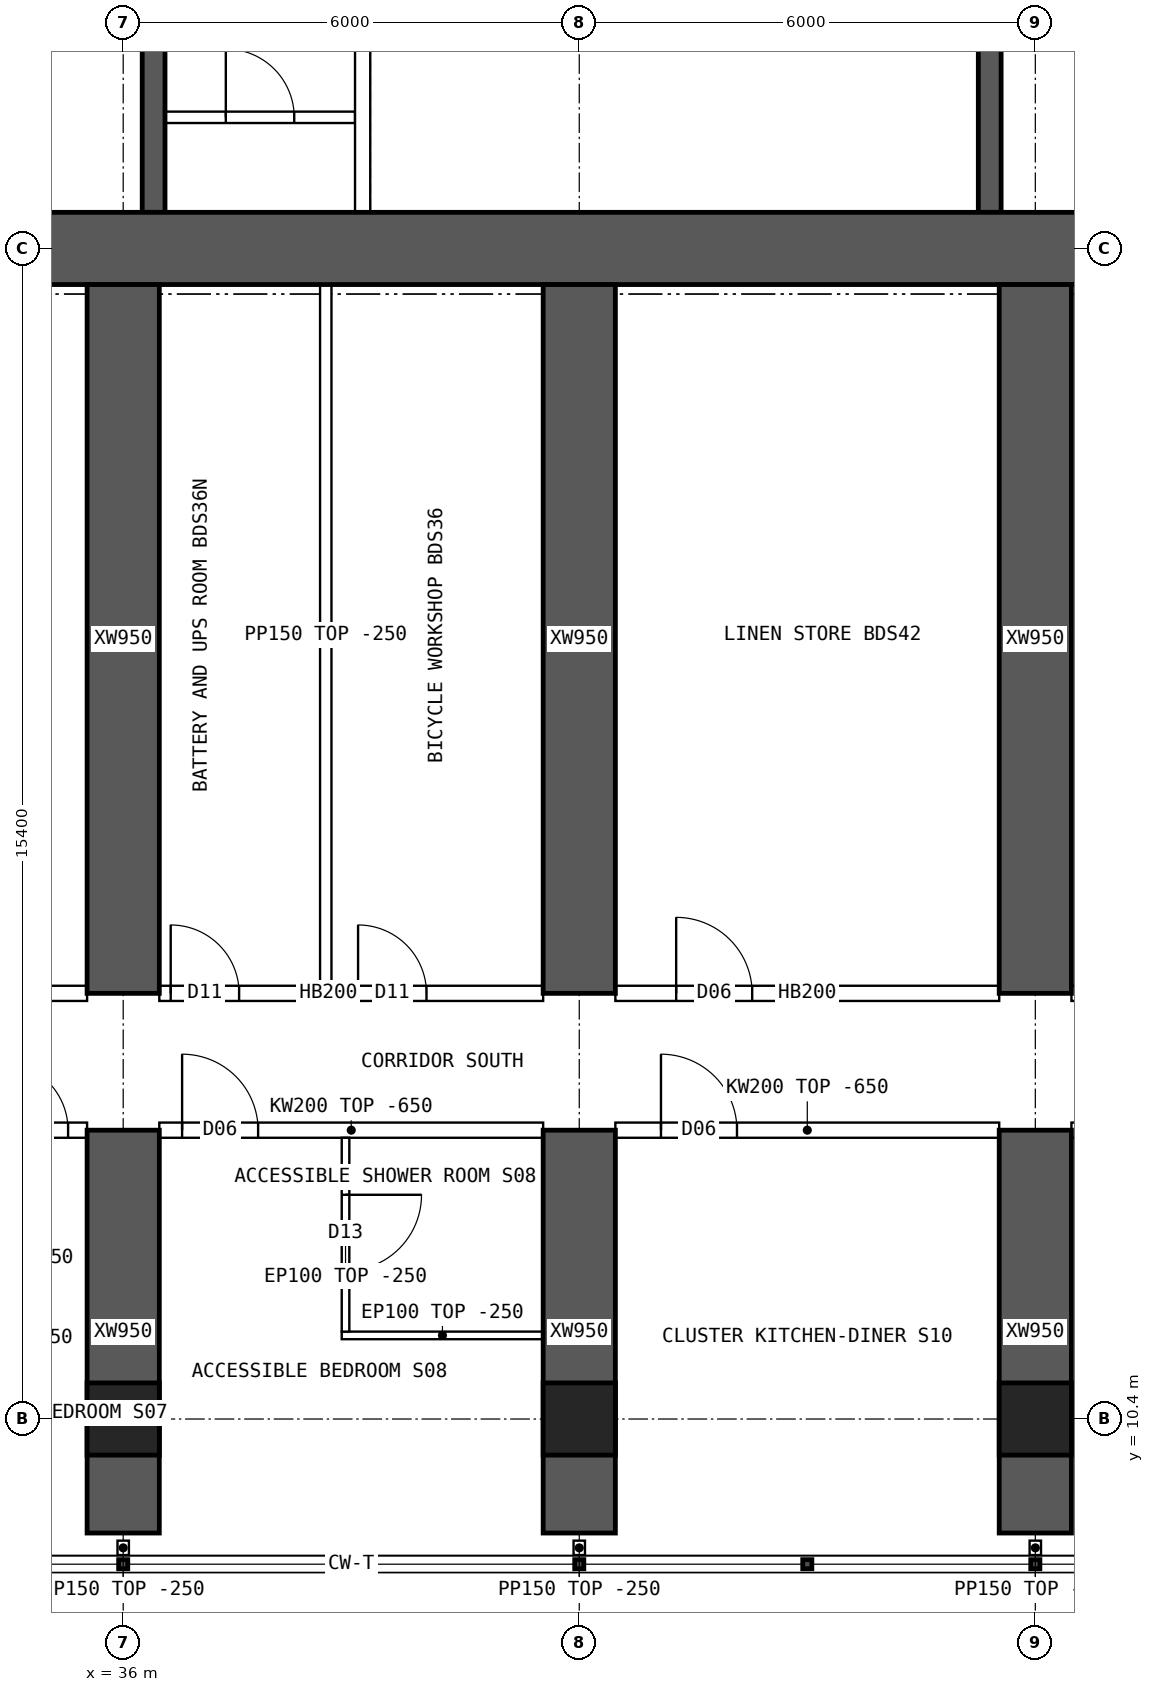
"""IFC4 building model, lengths in metres.
Left out: names, types, materials, properties, quantities, classifications, styles, units other than length and angle.
Written with IfcOpenShell. Run it as: python <this file> out.ifc"""

import sys

from ifc_helpers import new_model, si_unit, direction, frame, frame_2d, origin, origin_2d, place, context, subcontext, project, spatial, polyline, rectangle, hollow_rectangle, outline, extrude, element, fill, save


model = new_model("IFC4")
c1 = context("Model", 3, precision=1e-05, world=origin(), true_north=direction((0.0, 1.0)))
c2 = subcontext(c1, "Body", "Model", "MODEL_VIEW")
j1 = project(units=[si_unit("LENGTHUNIT", "METRE"), si_unit("PLANEANGLEUNIT", "RADIAN")], contexts=[c1])
p1 = place(None, origin())
s1 = spatial("IfcSite", under=j1, at=p1, CompositionType="ELEMENT")
p2 = place(p1, origin())
s2 = spatial("IfcBuilding", under=s1, at=p2, CompositionType="ELEMENT")
p3 = place(p2, frame((0.0, 0.0, 114.4)))
s3 = spatial("IfcBuildingStorey", under=s2, at=p3, CompositionType="ELEMENT", Elevation=114.4)
for number, where, z_axis, x_axis in (
    (1, (36.0, 10.4, 0.0), (0.0, 0.0, 1.0), (1.0, 0.0, 0.0)),
    (2, (42.0, 10.4, 0.0), (0.0, 0.0, 1.0), (1.0, 0.0, 0.0)),
    (3, (48.0, 10.4, 0.0), (0.0, 0.0, 1.0), (1.0, 0.0, 0.0)),
):
    element("IfcColumn", number, at=place(p3, frame(where, z_axis=z_axis, x_axis=x_axis)), inside=s3, PredefinedType="COLUMN", context=c2, shape_type="SweptSolid", body=[
        extrude(hollow_rectangle(XDim=0.95, YDim=0.95, WallThickness=0.095, at=origin_2d()), origin(), (0.0, 0.0, 1.0), 3.75),
    ])
p4 = place(p3, frame((18.0, 25.8, 0.0), z_axis=(0.0, 0.0, 1.0), x_axis=(1.0, 0.0, 0.0)))
e4 = element("IfcWall", 4, at=p4, inside=s3, PredefinedType="SHEAR", context=c2, shape_type="SweptSolid", body=[
    extrude(rectangle(XDim=48.0, YDim=0.95, at=frame_2d((24.0, 0.0))), origin(), (0.0, 0.0, 1.0), 3.75),
])
for number, where, z_axis, x_axis in (
    (5, (36.4, 26.275, 0.0), (0.0, 0.0, 1.0), (0.0, 1.0, 0.0)),
    (6, (47.4, 26.275, 0.0), (0.0, 0.0, 1.0), (0.0, 1.0, 0.0)),
):
    element("IfcWall", number, at=place(p3, frame(where, z_axis=z_axis, x_axis=x_axis)), inside=s3, PredefinedType="SHEAR", context=c2, shape_type="SweptSolid", body=[
        extrude(rectangle(XDim=3.975, YDim=0.3, at=frame_2d((1.988, 0.0))), origin(), (0.0, 0.0, 1.0), 3.75),
    ])
p5 = place(p3, frame((36.0, 8.9, 0.0), z_axis=(0.0, 0.0, 1.0), x_axis=(0.0, 1.0, 0.0)))
e7 = element("IfcWall", 7, at=p5, inside=s3, PredefinedType="SHEAR", context=c2, shape_type="SweptSolid", body=[
    extrude(rectangle(XDim=5.3, YDim=0.95, at=frame_2d((2.65, 0.0))), origin(), (0.0, 0.0, 1.0), 3.75),
])
p6 = place(p3, frame((36.0, 16.0, 0.0), z_axis=(0.0, 0.0, 1.0), x_axis=(0.0, 1.0, 0.0)))
e8 = element("IfcWall", 8, at=p6, inside=s3, PredefinedType="SHEAR", context=c2, shape_type="SweptSolid", body=[
    extrude(rectangle(XDim=9.325, YDim=0.95, at=frame_2d((4.663, 0.0))), origin(), (0.0, 0.0, 1.0), 3.75),
])
p7 = place(p3, frame((42.0, 8.9, 0.0), z_axis=(0.0, 0.0, 1.0), x_axis=(0.0, 1.0, 0.0)))
e9 = element("IfcWall", 9, at=p7, inside=s3, PredefinedType="SHEAR", context=c2, shape_type="SweptSolid", body=[
    extrude(rectangle(XDim=5.3, YDim=0.95, at=frame_2d((2.65, 0.0))), origin(), (0.0, 0.0, 1.0), 3.75),
])
p8 = place(p3, frame((42.0, 16.0, 0.0), z_axis=(0.0, 0.0, 1.0), x_axis=(0.0, 1.0, 0.0)))
e10 = element("IfcWall", 10, at=p8, inside=s3, PredefinedType="SHEAR", context=c2, shape_type="SweptSolid", body=[
    extrude(rectangle(XDim=9.325, YDim=0.95, at=frame_2d((4.663, 0.0))), origin(), (0.0, 0.0, 1.0), 3.75),
])
p9 = place(p3, frame((48.0, 8.9, 0.0), z_axis=(0.0, 0.0, 1.0), x_axis=(0.0, 1.0, 0.0)))
e11 = element("IfcWall", 11, at=p9, inside=s3, PredefinedType="SHEAR", context=c2, shape_type="SweptSolid", body=[
    extrude(rectangle(XDim=5.3, YDim=0.95, at=frame_2d((2.65, 0.0))), origin(), (0.0, 0.0, 1.0), 3.75),
])
p10 = place(p3, frame((48.0, 16.0, 0.0), z_axis=(0.0, 0.0, 1.0), x_axis=(0.0, 1.0, 0.0)))
e12 = element("IfcWall", 12, at=p10, inside=s3, PredefinedType="SHEAR", context=c2, shape_type="SweptSolid", body=[
    extrude(rectangle(XDim=9.325, YDim=0.95, at=frame_2d((4.663, 0.0))), origin(), (0.0, 0.0, 1.0), 3.75),
])
p11 = place(p3, frame((36.55, 27.525, 0.0), z_axis=(0.0, 0.0, 1.0), x_axis=(1.0, 0.0, 0.0)))
e13 = element("IfcWall", 13, at=p11, inside=s3, PredefinedType="SOLIDWALL", context=c2, shape_type="SweptSolid", body=[
    extrude(rectangle(XDim=2.5, YDim=0.15, at=frame_2d((1.25, 0.0))), origin(), (0.0, 0.0, 1.0), 3.5),
])
p12 = place(p11, frame((0.8, 0.0, 0.0)))
e14 = element("IfcOpeningElement", 14, at=p12, cuts=e13, PredefinedType="OPENING", context=c2, shape_type="SweptSolid", body=[
    extrude(rectangle(XDim=0.9, YDim=2.1, at=frame_2d((0.45, 1.05))), frame((0.0, 0.085, 0.0), z_axis=(0.0, -1.0, 0.0), x_axis=(1.0, 0.0, 0.0)), (0.0, 0.0, 1.0), 0.17),
])
p13 = place(p3, frame((39.15, 26.275, 0.0), z_axis=(0.0, 0.0, 1.0), x_axis=(0.0, 1.0, 0.0)))
e15 = element("IfcWall", 15, at=p13, inside=s3, PredefinedType="SOLIDWALL", context=c2, shape_type="SweptSolid", body=[
    extrude(rectangle(XDim=3.975, YDim=0.2, at=frame_2d((1.988, 0.0))), origin(), (0.0, 0.0, 1.0), 3.5),
])
p14 = place(p3, frame((30.475, 14.2, 0.0), z_axis=(0.0, 0.0, 1.0), x_axis=(1.0, 0.0, 0.0)))
e16 = element("IfcWall", 16, at=p14, inside=s3, PredefinedType="SOLIDWALL", context=c2, shape_type="SweptSolid", body=[
    extrude(outline(polyline([(0.0, 0.0), (5.05, 0.0), (5.05, 3.1), (0.0, 3.1), (0.0, 0.0)])), frame((0.0, 0.1, 0.0), z_axis=(0.0, -1.0, 0.0), x_axis=(1.0, 0.0, 0.0)), (0.0, 0.0, 1.0), 0.2),
])
p15 = place(p14, frame((0.1, 0.0, 0.0)))
e17 = element("IfcOpeningElement", 17, at=p15, cuts=e16, PredefinedType="OPENING", context=c2, shape_type="SweptSolid", body=[
    extrude(rectangle(XDim=0.9, YDim=2.1, at=frame_2d((0.45, 1.05))), frame((0.0, 0.11, 0.0), z_axis=(0.0, -1.0, 0.0), x_axis=(1.0, 0.0, 0.0)), (0.0, 0.0, 1.0), 0.22),
])
p16 = place(p14, frame((3.9, 0.0, 0.0)))
e18 = element("IfcOpeningElement", 18, at=p16, cuts=e16, PredefinedType="OPENING", context=c2, shape_type="SweptSolid", body=[
    extrude(rectangle(XDim=0.9, YDim=2.1, at=frame_2d((0.45, 1.05))), frame((0.0, 0.11, 0.0), z_axis=(0.0, -1.0, 0.0), x_axis=(1.0, 0.0, 0.0)), (0.0, 0.0, 1.0), 0.22),
])
p17 = place(p3, frame((30.475, 16.0, 0.0), z_axis=(0.0, 0.0, 1.0), x_axis=(1.0, 0.0, 0.0)))
e19 = element("IfcWall", 19, at=p17, inside=s3, PredefinedType="SOLIDWALL", context=c2, shape_type="SweptSolid", body=[
    extrude(rectangle(XDim=5.05, YDim=0.2, at=frame_2d((2.525, 0.0))), origin(), (0.0, 0.0, 1.0), 3.5),
])
p18 = place(p17, frame((0.8, 0.0, 0.0)))
e20 = element("IfcOpeningElement", 20, at=p18, cuts=e19, PredefinedType="OPENING", context=c2, shape_type="SweptSolid", body=[
    extrude(rectangle(XDim=1.0, YDim=2.1, at=frame_2d((0.5, 1.05))), frame((0.0, 0.11, 0.0), z_axis=(0.0, -1.0, 0.0), x_axis=(1.0, 0.0, 0.0)), (0.0, 0.0, 1.0), 0.22),
])
p19 = place(p3, frame((36.475, 14.2, 0.0), z_axis=(0.0, 0.0, 1.0), x_axis=(1.0, 0.0, 0.0)))
e21 = element("IfcWall", 21, at=p19, inside=s3, PredefinedType="SOLIDWALL", context=c2, shape_type="SweptSolid", body=[
    extrude(outline(polyline([(0.0, 0.0), (5.05, 0.0), (5.05, 3.1), (0.0, 3.1), (0.0, 0.0)])), frame((0.0, 0.1, 0.0), z_axis=(0.0, -1.0, 0.0), x_axis=(1.0, 0.0, 0.0)), (0.0, 0.0, 1.0), 0.2),
])
p20 = place(p19, frame((0.3, 0.0, 0.0)))
e22 = element("IfcOpeningElement", 22, at=p20, cuts=e21, PredefinedType="OPENING", context=c2, shape_type="SweptSolid", body=[
    extrude(rectangle(XDim=1.0, YDim=2.1, at=frame_2d((0.5, 1.05))), frame((0.0, 0.11, 0.0), z_axis=(0.0, -1.0, 0.0), x_axis=(1.0, 0.0, 0.0)), (0.0, 0.0, 1.0), 0.22),
])
p21 = place(p3, frame((36.475, 16.0, 0.0), z_axis=(0.0, 0.0, 1.0), x_axis=(1.0, 0.0, 0.0)))
e23 = element("IfcWall", 23, at=p21, inside=s3, PredefinedType="SOLIDWALL", context=c2, shape_type="SweptSolid", body=[
    extrude(rectangle(XDim=5.05, YDim=0.2, at=frame_2d((2.525, 0.0))), origin(), (0.0, 0.0, 1.0), 3.5),
])
p22 = place(p21, frame((0.15, 0.0, 0.0)))
e24 = element("IfcOpeningElement", 24, at=p22, cuts=e23, PredefinedType="OPENING", context=c2, shape_type="SweptSolid", body=[
    extrude(rectangle(XDim=0.9, YDim=2.1, at=frame_2d((0.45, 1.05))), frame((0.0, 0.11, 0.0), z_axis=(0.0, -1.0, 0.0), x_axis=(1.0, 0.0, 0.0)), (0.0, 0.0, 1.0), 0.22),
])
p23 = place(p21, frame((2.615, 0.0, 0.0)))
e25 = element("IfcOpeningElement", 25, at=p23, cuts=e23, PredefinedType="OPENING", context=c2, shape_type="SweptSolid", body=[
    extrude(rectangle(XDim=0.9, YDim=2.1, at=frame_2d((0.45, 1.05))), frame((0.0, 0.11, 0.0), z_axis=(0.0, -1.0, 0.0), x_axis=(1.0, 0.0, 0.0)), (0.0, 0.0, 1.0), 0.22),
])
p24 = place(p3, frame((42.475, 14.2, 0.0), z_axis=(0.0, 0.0, 1.0), x_axis=(1.0, 0.0, 0.0)))
e26 = element("IfcWall", 26, at=p24, inside=s3, PredefinedType="SOLIDWALL", context=c2, shape_type="SweptSolid", body=[
    extrude(outline(polyline([(0.0, 0.0), (5.05, 0.0), (5.05, 3.1), (0.0, 3.1), (0.0, 0.0)])), frame((0.0, 0.1, 0.0), z_axis=(0.0, -1.0, 0.0), x_axis=(1.0, 0.0, 0.0)), (0.0, 0.0, 1.0), 0.2),
])
p25 = place(p24, frame((0.6, 0.0, 0.0)))
e27 = element("IfcOpeningElement", 27, at=p25, cuts=e26, PredefinedType="OPENING", context=c2, shape_type="SweptSolid", body=[
    extrude(rectangle(XDim=1.0, YDim=2.1, at=frame_2d((0.5, 1.05))), frame((0.0, 0.11, 0.0), z_axis=(0.0, -1.0, 0.0), x_axis=(1.0, 0.0, 0.0)), (0.0, 0.0, 1.0), 0.22),
])
p26 = place(p3, frame((42.475, 16.0, 0.0), z_axis=(0.0, 0.0, 1.0), x_axis=(1.0, 0.0, 0.0)))
e28 = element("IfcWall", 28, at=p26, inside=s3, PredefinedType="SOLIDWALL", context=c2, shape_type="SweptSolid", body=[
    extrude(rectangle(XDim=5.05, YDim=0.2, at=frame_2d((2.525, 0.0))), origin(), (0.0, 0.0, 1.0), 3.5),
])
p27 = place(p26, frame((0.8, 0.0, 0.0)))
e29 = element("IfcOpeningElement", 29, at=p27, cuts=e28, PredefinedType="OPENING", context=c2, shape_type="SweptSolid", body=[
    extrude(rectangle(XDim=1.0, YDim=2.1, at=frame_2d((0.5, 1.05))), frame((0.0, 0.11, 0.0), z_axis=(0.0, -1.0, 0.0), x_axis=(1.0, 0.0, 0.0)), (0.0, 0.0, 1.0), 0.22),
])
p28 = place(p3, frame((48.475, 14.2, 0.0), z_axis=(0.0, 0.0, 1.0), x_axis=(1.0, 0.0, 0.0)))
e30 = element("IfcWall", 30, at=p28, inside=s3, PredefinedType="SOLIDWALL", context=c2, shape_type="SweptSolid", body=[
    extrude(outline(polyline([(0.0, 0.0), (5.05, 0.0), (5.05, 3.1), (0.0, 3.1), (0.0, 0.0)])), frame((0.0, 0.1, 0.0), z_axis=(0.0, -1.0, 0.0), x_axis=(1.0, 0.0, 0.0)), (0.0, 0.0, 1.0), 0.2),
])
p29 = place(p28, frame((0.1, 0.0, 0.0)))
e31 = element("IfcOpeningElement", 31, at=p29, cuts=e30, PredefinedType="OPENING", context=c2, shape_type="SweptSolid", body=[
    extrude(rectangle(XDim=0.9, YDim=2.1, at=frame_2d((0.45, 1.05))), frame((0.0, 0.11, 0.0), z_axis=(0.0, -1.0, 0.0), x_axis=(1.0, 0.0, 0.0)), (0.0, 0.0, 1.0), 0.22),
])
p30 = place(p28, frame((3.9, 0.0, 0.0)))
e32 = element("IfcOpeningElement", 32, at=p30, cuts=e30, PredefinedType="OPENING", context=c2, shape_type="SweptSolid", body=[
    extrude(rectangle(XDim=0.9, YDim=2.1, at=frame_2d((0.45, 1.05))), frame((0.0, 0.11, 0.0), z_axis=(0.0, -1.0, 0.0), x_axis=(1.0, 0.0, 0.0)), (0.0, 0.0, 1.0), 0.22),
])
p31 = place(p3, frame((48.475, 16.0, 0.0), z_axis=(0.0, 0.0, 1.0), x_axis=(1.0, 0.0, 0.0)))
e33 = element("IfcWall", 33, at=p31, inside=s3, PredefinedType="SOLIDWALL", context=c2, shape_type="SweptSolid", body=[
    extrude(rectangle(XDim=5.05, YDim=0.2, at=frame_2d((2.525, 0.0))), origin(), (0.0, 0.0, 1.0), 3.5),
])
p32 = place(p31, frame((0.4, 0.0, 0.0)))
e34 = element("IfcOpeningElement", 34, at=p32, cuts=e33, PredefinedType="OPENING", context=c2, shape_type="SweptSolid", body=[
    extrude(rectangle(XDim=1.0, YDim=2.1, at=frame_2d((0.5, 1.05))), frame((0.0, 0.11, 0.0), z_axis=(0.0, -1.0, 0.0), x_axis=(1.0, 0.0, 0.0)), (0.0, 0.0, 1.0), 0.22),
])
p33 = place(p3, frame((38.875, 11.5, 0.0), z_axis=(0.0, 0.0, 1.0), x_axis=(1.0, 0.0, 0.0)))
e35 = element("IfcWall", 35, at=p33, inside=s3, PredefinedType="PARTITIONING", context=c2, shape_type="SweptSolid", body=[
    extrude(rectangle(XDim=2.65, YDim=0.1, at=frame_2d((1.325, 0.0))), origin(), (0.0, 0.0, 1.0), 3.5),
])
p34 = place(p3, frame((38.925, 11.55, 0.0), z_axis=(0.0, 0.0, 1.0), x_axis=(0.0, 1.0, 0.0)))
e36 = element("IfcWall", 36, at=p34, inside=s3, PredefinedType="PARTITIONING", context=c2, shape_type="SweptSolid", body=[
    extrude(outline(polyline([(0.0, 0.0), (2.55, 0.0), (2.55, 3.1), (2.502, 3.1), (2.5, 3.5), (0.0, 3.5), (0.0, 0.0)])), frame((0.0, 0.05, 0.0), z_axis=(0.0, -1.0, 0.0), x_axis=(1.0, 0.0, 0.0)), (0.0, 0.0, 1.0), 0.1),
])
p35 = place(p34, frame((0.8, 0.0, 0.0)))
e37 = element("IfcOpeningElement", 37, at=p35, cuts=e36, PredefinedType="OPENING", context=c2, shape_type="SweptSolid", body=[
    extrude(rectangle(XDim=1.0, YDim=2.1, at=frame_2d((0.5, 1.05))), frame((0.0, 0.06, 0.0), z_axis=(0.0, -1.0, 0.0), x_axis=(1.0, 0.0, 0.0)), (0.0, 0.0, 1.0), 0.12),
])
p36 = place(p3, frame((38.665, 16.1, 0.0), z_axis=(0.0, 0.0, 1.0), x_axis=(0.0, 1.0, 0.0)))
e38 = element("IfcWall", 38, at=p36, inside=s3, PredefinedType="PARTITIONING", context=c2, shape_type="SweptSolid", body=[
    extrude(rectangle(XDim=9.225, YDim=0.15, at=frame_2d((4.612, 0.0))), origin(), (0.0, 0.0, 1.0), 3.5),
])
for number, where, z_axis, x_axis in (
    (39, (36.0, 8.8, 0.0), (0.0, 0.0, 1.0), (0.0, -1.0, 0.0)),
    (40, (42.0, 8.8, 0.0), (0.0, 0.0, 1.0), (0.0, -1.0, 0.0)),
    (41, (48.0, 8.8, 0.0), (0.0, 0.0, 1.0), (0.0, -1.0, 0.0)),
):
    element("IfcWall", number, at=place(p3, frame(where, z_axis=z_axis, x_axis=x_axis)), inside=s3, PredefinedType="PARTITIONING", context=c2, shape_type="SweptSolid", body=[
        extrude(rectangle(XDim=0.19, YDim=0.15, at=frame_2d((0.095, 0.0))), origin(), (0.0, 0.0, 1.0), 3.5),
    ])
p37 = place(p12, origin())
e42 = element("IfcDoor", 42, at=p37, inside=s3, OperationType="SINGLE_SWING_LEFT", PredefinedType="DOOR", context=c2, shape_type="SweptSolid", body=[
    extrude(rectangle(XDim=0.9, YDim=2.1, at=frame_2d((0.45, 1.05))), frame((0.0, 0.025, 0.0), z_axis=(0.0, -1.0, 0.0), x_axis=(1.0, 0.0, 0.0)), (0.0, 0.0, 1.0), 0.05),
])
fill(e14, e42)
p38 = place(p16, origin())
e43 = element("IfcDoor", 43, at=p38, inside=s3, OperationType="SINGLE_SWING_LEFT", PredefinedType="DOOR", context=c2, shape_type="SweptSolid", body=[
    extrude(rectangle(XDim=0.9, YDim=2.1, at=frame_2d((0.45, 1.05))), frame((0.0, 0.025, 0.0), z_axis=(0.0, -1.0, 0.0), x_axis=(1.0, 0.0, 0.0)), (0.0, 0.0, 1.0), 0.05),
])
fill(e18, e43)
p39 = place(p35, origin())
e44 = element("IfcDoor", 44, at=p39, inside=s3, OperationType="SINGLE_SWING_RIGHT", PredefinedType="DOOR", context=c2, shape_type="SweptSolid", body=[
    extrude(rectangle(XDim=1.0, YDim=2.1, at=frame_2d((0.5, 1.05))), frame((0.0, 0.025, 0.0), z_axis=(0.0, -1.0, 0.0), x_axis=(1.0, 0.0, 0.0)), (0.0, 0.0, 1.0), 0.05),
])
fill(e37, e44)
p40 = place(p20, origin())
e45 = element("IfcDoor", 45, at=p40, inside=s3, OperationType="SINGLE_SWING_LEFT", PredefinedType="DOOR", context=c2, shape_type="SweptSolid", body=[
    extrude(rectangle(XDim=1.0, YDim=2.1, at=frame_2d((0.5, 1.05))), frame((0.0, 0.025, 0.0), z_axis=(0.0, -1.0, 0.0), x_axis=(1.0, 0.0, 0.0)), (0.0, 0.0, 1.0), 0.05),
])
fill(e22, e45)
p41 = place(p25, origin())
e46 = element("IfcDoor", 46, at=p41, inside=s3, OperationType="SINGLE_SWING_LEFT", PredefinedType="DOOR", context=c2, shape_type="SweptSolid", body=[
    extrude(rectangle(XDim=1.0, YDim=2.1, at=frame_2d((0.5, 1.05))), frame((0.0, 0.025, 0.0), z_axis=(0.0, -1.0, 0.0), x_axis=(1.0, 0.0, 0.0)), (0.0, 0.0, 1.0), 0.05),
])
fill(e27, e46)
p42 = place(p22, origin())
e47 = element("IfcDoor", 47, at=p42, inside=s3, OperationType="SINGLE_SWING_LEFT", PredefinedType="DOOR", context=c2, shape_type="SweptSolid", body=[
    extrude(rectangle(XDim=0.9, YDim=2.1, at=frame_2d((0.45, 1.05))), frame((0.0, 0.025, 0.0), z_axis=(0.0, -1.0, 0.0), x_axis=(1.0, 0.0, 0.0)), (0.0, 0.0, 1.0), 0.05),
])
fill(e24, e47)
p43 = place(p23, origin())
e48 = element("IfcDoor", 48, at=p43, inside=s3, OperationType="SINGLE_SWING_LEFT", PredefinedType="DOOR", context=c2, shape_type="SweptSolid", body=[
    extrude(rectangle(XDim=0.9, YDim=2.1, at=frame_2d((0.45, 1.05))), frame((0.0, 0.025, 0.0), z_axis=(0.0, -1.0, 0.0), x_axis=(1.0, 0.0, 0.0)), (0.0, 0.0, 1.0), 0.05),
])
fill(e25, e48)
p44 = place(p27, origin())
e49 = element("IfcDoor", 49, at=p44, inside=s3, OperationType="SINGLE_SWING_LEFT", PredefinedType="DOOR", context=c2, shape_type="SweptSolid", body=[
    extrude(rectangle(XDim=1.0, YDim=2.1, at=frame_2d((0.5, 1.05))), frame((0.0, 0.025, 0.0), z_axis=(0.0, -1.0, 0.0), x_axis=(1.0, 0.0, 0.0)), (0.0, 0.0, 1.0), 0.05),
])
fill(e29, e49)
save(model, sys.argv[1])
